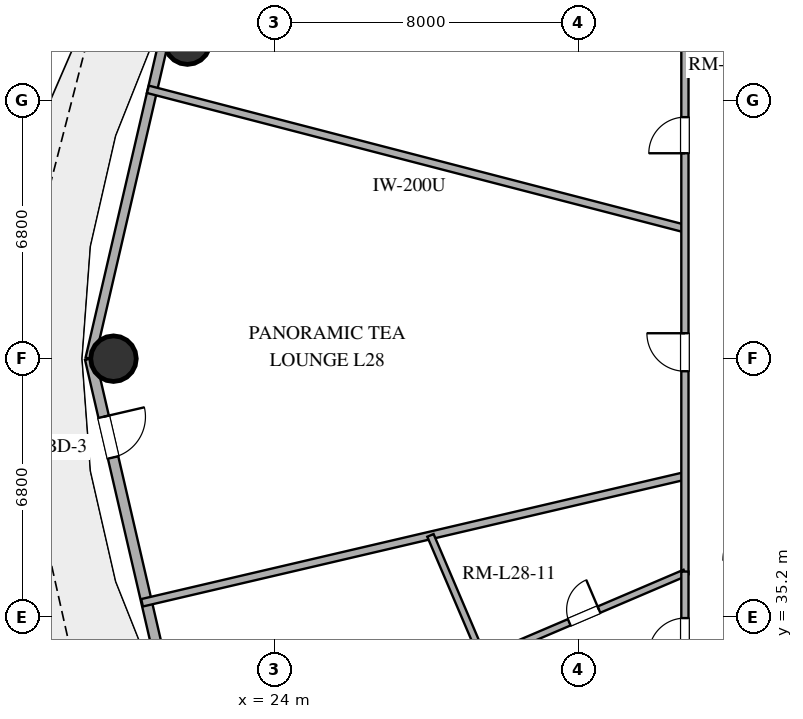
"""IFC4 building model, lengths in metres.
Left out: names, types, materials, properties, quantities, classifications, styles, units other than length and angle.
Written with IfcOpenShell. Run it as: python <this file> out.ifc"""

import sys

from ifc_helpers import new_model, si_unit, direction, frame, frame_2d, origin, origin_2d, place, context, subcontext, project, spatial, rectangle, hollow_circle, extrude, element, fill, save


model = new_model("IFC4")
c1 = context("Model", 3, precision=1e-05, world=origin(), true_north=direction((0.0, 1.0)))
c2 = subcontext(c1, "Body", "Model", "MODEL_VIEW")
j1 = project(units=[si_unit("LENGTHUNIT", "METRE"), si_unit("PLANEANGLEUNIT", "RADIAN")], contexts=[c1])
p1 = place(None, origin())
s1 = spatial("IfcSite", under=j1, at=p1, CompositionType="ELEMENT")
p2 = place(p1, origin())
s2 = spatial("IfcBuilding", under=s1, at=p2, CompositionType="ELEMENT")
p3 = place(p2, frame((0.0, 0.0, 112.8)))
s3 = spatial("IfcBuildingStorey", under=s2, at=p3, CompositionType="ELEMENT", Elevation=112.8)
for number, where, z_axis, x_axis in (
    (1, (21.709, 50.343, 0.0), (0.0, 0.0, 1.0), (1.0, 0.0, 0.0)),
    (2, (19.763, 42.0, 0.0), (0.0, 0.0, 1.0), (1.0, 0.0, 0.0)),
):
    element("IfcColumn", number, at=place(p3, frame(where, z_axis=z_axis, x_axis=x_axis)), inside=s3, PredefinedType="COLUMN", context=c2, shape_type="SweptSolid", body=[
        extrude(hollow_circle(Radius=0.6, WallThickness=0.032, at=origin_2d()), origin(), (0.0, 0.0, 1.0), 3.38),
    ])
p4 = place(p3, frame((21.139, 50.583, 0.0), z_axis=(0.0, 0.0, 1.0), x_axis=(-0.22558597182, -0.974223264616, 0.0)))
e3 = element("IfcWall", 3, at=p4, inside=s3, PredefinedType="SOLIDWALL", context=c2, shape_type="SweptSolid", body=[
    extrude(rectangle(XDim=8.811, YDim=0.25, at=frame_2d((4.405, 0.0))), origin(), (0.0, 0.0, 1.0), 3.38),
])
p5 = place(p3, frame((19.151, 42.0, 0.0), z_axis=(0.0, 0.0, 1.0), x_axis=(0.22558597182, -0.974223264616, 0.0)))
e4 = element("IfcWall", 4, at=p5, inside=s3, PredefinedType="SOLIDWALL", context=c2, shape_type="SweptSolid", body=[
    extrude(rectangle(XDim=8.811, YDim=0.28, at=frame_2d((4.405, 0.0))), origin(), (0.0, 0.0, 1.0), 3.38),
])
p6 = place(p5, frame((1.568, 0.0, 0.0)))
e5 = element("IfcOpeningElement", 5, at=p6, cuts=e4, PredefinedType="OPENING", context=c2, shape_type="SweptSolid", body=[
    extrude(rectangle(XDim=1.1, YDim=2.25, at=frame_2d((0.55, 1.125))), frame((0.0, 0.15, 0.0), z_axis=(0.0, -1.0, 0.0), x_axis=(1.0, 0.0, 0.0)), (0.0, 0.0, 1.0), 0.3),
])
p7 = place(p3, frame((34.8, 45.423, 0.0), z_axis=(0.0, 0.0, 1.0), x_axis=(-0.967976280286, 0.251041671447, 0.0)))
e6 = element("IfcWall", 6, at=p7, inside=s3, PredefinedType="PARTITIONING", context=c2, shape_type="SweptSolid", body=[
    extrude(rectangle(XDim=14.598, YDim=0.2, at=frame_2d((7.299, 0.0))), origin(), (0.0, 0.0, 1.0), 2.74),
])
p8 = place(p3, frame((34.8, 38.915, 0.0), z_axis=(0.0, 0.0, 1.0), x_axis=(-0.973762218061, -0.227567885864, 0.0)))
e7 = element("IfcWall", 7, at=p8, inside=s3, PredefinedType="PARTITIONING", context=c2, shape_type="SweptSolid", body=[
    extrude(rectangle(XDim=14.67, YDim=0.2, at=frame_2d((7.335, 0.0))), origin(), (0.0, 0.0, 1.0), 2.74),
])
p9 = place(p3, frame((34.8, 36.329, 0.0), z_axis=(0.0, 0.0, 1.0), x_axis=(0.0, 1.0, 0.0)))
e8 = element("IfcWall", 8, at=p9, inside=s3, PredefinedType="PARTITIONING", context=c2, shape_type="SweptSolid", body=[
    extrude(rectangle(XDim=14.671, YDim=0.19, at=frame_2d((7.336, 0.0))), origin(), (0.0, 0.0, 1.0), 2.74),
])
p10 = place(p9, frame((5.341, 0.0, 0.0)))
e9 = element("IfcOpeningElement", 9, at=p10, cuts=e8, PredefinedType="OPENING", context=c2, shape_type="SweptSolid", body=[
    extrude(rectangle(XDim=1.0, YDim=2.2, at=frame_2d((0.5, 1.1))), frame((0.0, 0.105, 0.0), z_axis=(0.0, -1.0, 0.0), x_axis=(1.0, 0.0, 0.0)), (0.0, 0.0, 1.0), 0.21),
])
p11 = place(p9, frame((11.076, 0.0, 0.0)))
e10 = element("IfcOpeningElement", 10, at=p11, cuts=e8, PredefinedType="OPENING", context=c2, shape_type="SweptSolid", body=[
    extrude(rectangle(XDim=0.95, YDim=2.15, at=frame_2d((0.475, 1.075))), frame((0.0, 0.105, 0.0), z_axis=(0.0, -1.0, 0.0), x_axis=(1.0, 0.0, 0.0)), (0.0, 0.0, 1.0), 0.21),
])
p12 = place(p3, frame((29.493, 34.097, 0.0), z_axis=(0.0, 0.0, 1.0), x_axis=(0.919684682014, 0.392657720755, 0.0)))
e11 = element("IfcWall", 11, at=p12, inside=s3, PredefinedType="PLUMBINGWALL", context=c2, shape_type="SweptSolid", body=[
    extrude(rectangle(XDim=5.771, YDim=0.18, at=frame_2d((2.885, 0.0))), origin(), (0.0, 0.0, 1.0), 2.74),
])
p13 = place(p12, frame((2.46, 0.0, 0.0)))
e12 = element("IfcOpeningElement", 12, at=p13, cuts=e11, PredefinedType="OPENING", context=c2, shape_type="SweptSolid", body=[
    extrude(rectangle(XDim=0.85, YDim=2.1, at=frame_2d((0.425, 1.05))), frame((0.0, 0.1, 0.0), z_axis=(0.0, -1.0, 0.0), x_axis=(1.0, 0.0, 0.0)), (0.0, 0.0, 1.0), 0.2),
])
p14 = place(p3, frame((28.104, 37.35, 0.0), z_axis=(0.0, 0.0, 1.0), x_axis=(0.392677696951, -0.919676152957, 0.0)))
e13 = element("IfcWall", 13, at=p14, inside=s3, PredefinedType="PLUMBINGWALL", context=c2, shape_type="SweptSolid", body=[
    extrude(rectangle(XDim=3.537, YDim=0.18, at=frame_2d((1.769, 0.0))), origin(), (0.0, 0.0, 1.0), 2.74),
])
p15 = place(p3, frame((34.8, 33.0, 0.0), z_axis=(0.0, 0.0, 1.0), x_axis=(0.0, 1.0, 0.0)))
e14 = element("IfcWall", 14, at=p15, inside=s3, PredefinedType="PARTITIONING", context=c2, shape_type="SweptSolid", body=[
    extrude(rectangle(XDim=3.398, YDim=0.19, at=frame_2d((1.699, 0.0))), origin(), (0.0, 0.0, 1.0), 2.74),
])
p16 = place(p15, frame((1.224, 0.0, 0.0)))
e15 = element("IfcOpeningElement", 15, at=p16, cuts=e14, PredefinedType="OPENING", context=c2, shape_type="SweptSolid", body=[
    extrude(rectangle(XDim=0.95, YDim=2.15, at=frame_2d((0.475, 1.075))), frame((0.0, 0.105, 0.0), z_axis=(0.0, -1.0, 0.0), x_axis=(1.0, 0.0, 0.0)), (0.0, 0.0, 1.0), 0.21),
])
p17 = place(p6, origin())
e16 = element("IfcDoor", 16, at=p17, inside=s3, OperationType="SINGLE_SWING_LEFT", PredefinedType="DOOR", context=c2, shape_type="SweptSolid", body=[
    extrude(rectangle(XDim=1.1, YDim=2.25, at=frame_2d((0.55, 1.125))), frame((0.0, 0.025, 0.0), z_axis=(0.0, -1.0, 0.0), x_axis=(1.0, 0.0, 0.0)), (0.0, 0.0, 1.0), 0.05),
])
fill(e5, e16)
p18 = place(p10, origin())
e17 = element("IfcDoor", 17, at=p18, inside=s3, OperationType="SINGLE_SWING_RIGHT", PredefinedType="DOOR", context=c2, shape_type="SweptSolid", body=[
    extrude(rectangle(XDim=1.0, YDim=2.2, at=frame_2d((0.5, 1.1))), frame((0.0, 0.025, 0.0), z_axis=(0.0, -1.0, 0.0), x_axis=(1.0, 0.0, 0.0)), (0.0, 0.0, 1.0), 0.05),
])
fill(e9, e17)
p19 = place(p11, origin())
e18 = element("IfcDoor", 18, at=p19, inside=s3, OperationType="SINGLE_SWING_LEFT", PredefinedType="DOOR", context=c2, shape_type="SweptSolid", body=[
    extrude(rectangle(XDim=0.95, YDim=2.15, at=frame_2d((0.475, 1.075))), frame((0.0, 0.025, 0.0), z_axis=(0.0, -1.0, 0.0), x_axis=(1.0, 0.0, 0.0)), (0.0, 0.0, 1.0), 0.05),
])
fill(e10, e18)
p20 = place(p13, origin())
e19 = element("IfcDoor", 19, at=p20, inside=s3, OperationType="SINGLE_SWING_RIGHT", PredefinedType="DOOR", context=c2, shape_type="SweptSolid", body=[
    extrude(rectangle(XDim=0.85, YDim=2.1, at=frame_2d((0.425, 1.05))), frame((0.0, 0.025, 0.0), z_axis=(0.0, -1.0, 0.0), x_axis=(1.0, 0.0, 0.0)), (0.0, 0.0, 1.0), 0.05),
])
fill(e12, e19)
p21 = place(p16, origin())
e20 = element("IfcDoor", 20, at=p21, inside=s3, OperationType="SINGLE_SWING_LEFT", PredefinedType="DOOR", context=c2, shape_type="SweptSolid", body=[
    extrude(rectangle(XDim=0.95, YDim=2.15, at=frame_2d((0.475, 1.075))), frame((0.0, 0.025, 0.0), z_axis=(0.0, -1.0, 0.0), x_axis=(1.0, 0.0, 0.0)), (0.0, 0.0, 1.0), 0.05),
])
fill(e15, e20)
save(model, sys.argv[1])
